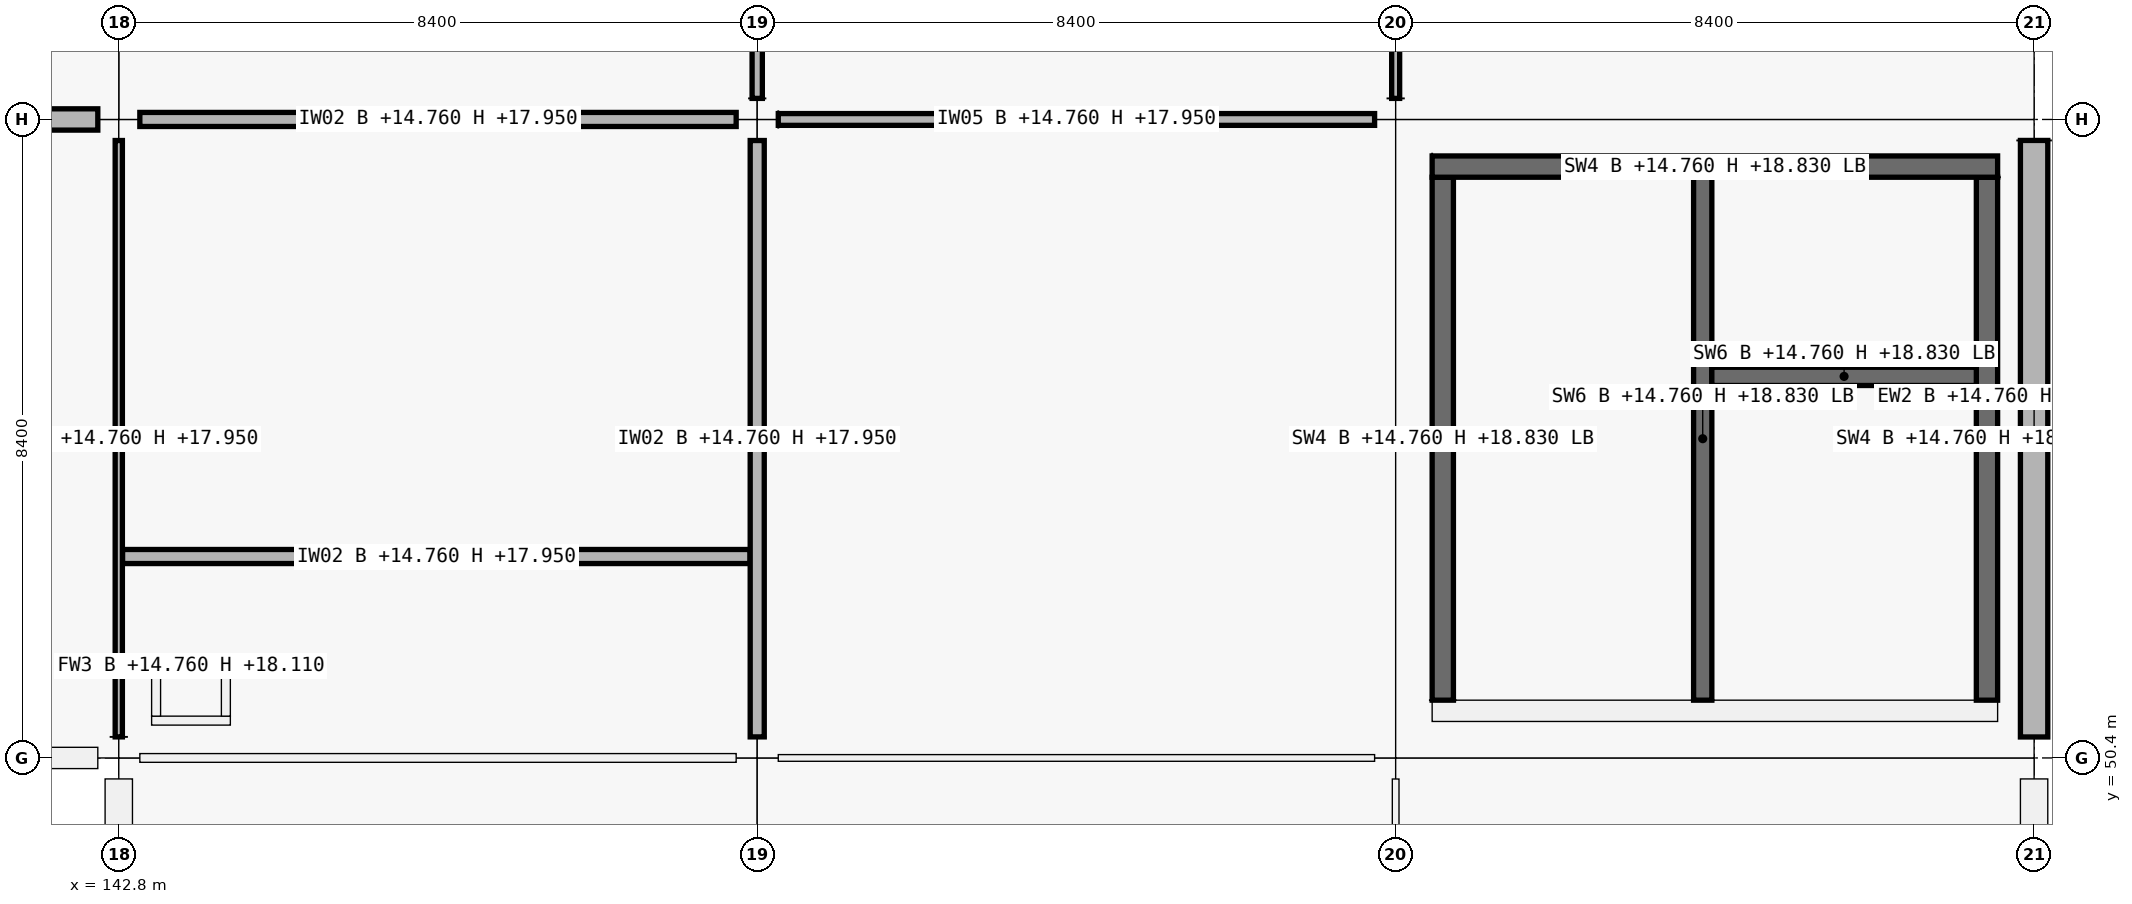
"""IFC4 building model, lengths in metres.
Left out: names, types, materials, properties, quantities, classifications, styles, units other than length and angle.
Written with IfcOpenShell. Run it as: python <this file> out.ifc"""

import sys

from ifc_helpers import new_model, si_unit, direction, frame, frame_2d, origin, origin_2d, place, context, subcontext, project, spatial, rectangle, i_section, extrude, element, fill, save


model = new_model("IFC4")
c1 = context("Model", 3, precision=1e-05, world=origin(), true_north=direction((0.0, 1.0)))
c2 = subcontext(c1, "Body", "Model", "MODEL_VIEW")
j1 = project(units=[si_unit("LENGTHUNIT", "METRE"), si_unit("PLANEANGLEUNIT", "RADIAN")], contexts=[c1])
p1 = place(None, origin())
s1 = spatial("IfcSite", under=j1, at=p1, CompositionType="ELEMENT")
p2 = place(p1, origin())
s2 = spatial("IfcBuilding", under=s1, at=p2, CompositionType="ELEMENT")
p3 = place(p2, frame((0.0, 0.0, 14.76)))
s3 = spatial("IfcBuildingStorey", under=s2, at=p3, CompositionType="ELEMENT", Elevation=14.76)
for number, where, z_axis, x_axis in (
    (1, (142.8, 50.4, 0.0), (0.0, 0.0, 1.0), (1.0, 0.0, 0.0)),
    (2, (142.8, 58.8, 0.0), (0.0, 0.0, 1.0), (1.0, 0.0, 0.0)),
    (3, (151.2, 50.4, 0.0), (0.0, 0.0, 1.0), (1.0, 0.0, 0.0)),
    (4, (151.2, 58.8, 0.0), (0.0, 0.0, 1.0), (1.0, 0.0, 0.0)),
    (5, (159.6, 50.4, 0.0), (0.0, 0.0, 1.0), (1.0, 0.0, 0.0)),
    (6, (159.6, 58.8, 0.0), (0.0, 0.0, 1.0), (1.0, 0.0, 0.0)),
    (7, (168.0, 50.4, 0.0), (0.0, 0.0, 1.0), (1.0, 0.0, 0.0)),
    (8, (168.0, 58.8, 0.0), (0.0, 0.0, 1.0), (1.0, 0.0, 0.0)),
):
    element("IfcColumn", number, at=place(p3, frame(where, z_axis=z_axis, x_axis=x_axis)), inside=s3, PredefinedType="COLUMN", context=c2, shape_type="SweptSolid", body=[
        extrude(rectangle(XDim=0.55, YDim=0.55, at=origin_2d()), origin(), (0.0, 0.0, 1.0), 4.17),
    ])
for number, where, z_axis, x_axis in (
    (9, (142.94, 50.4, 4.17), (0.0, 0.0, 1.0), (1.0, 0.0, 0.0)),
    (10, (151.2, 50.4, 4.17), (0.0, 0.0, 1.0), (1.0, 0.0, 0.0)),
    (11, (159.6, 50.4, 4.17), (0.0, 0.0, 1.0), (1.0, 0.0, 0.0)),
    (12, (167.86, 50.4, 4.17), (0.0, 0.0, 1.0), (1.0, 0.0, 0.0)),
    (13, (142.94, 58.8, 4.17), (0.0, 0.0, 1.0), (1.0, 0.0, 0.0)),
    (14, (151.2, 58.8, 4.17), (0.0, 0.0, 1.0), (1.0, 0.0, 0.0)),
    (15, (159.6, 58.8, 4.17), (0.0, 0.0, 1.0), (1.0, 0.0, 0.0)),
    (16, (167.86, 58.8, 4.17), (0.0, 0.0, 1.0), (1.0, 0.0, 0.0)),
):
    element("IfcColumn", number, at=place(p3, frame(where, z_axis=z_axis, x_axis=x_axis)), inside=s3, PredefinedType="COLUMN", context=c2, shape_type="SweptSolid", body=[
        extrude(i_section(OverallWidth=0.254, OverallDepth=0.254, WebThickness=0.009, FlangeThickness=0.014, FilletRadius=0.013, at=origin_2d()), origin(), (0.0, 0.0, 1.0), 2.157),
    ])
p4 = place(p3, frame((142.524, 50.4, 0.0), z_axis=(0.0, 0.0, 1.0), x_axis=(-1.0, 0.0, 0.0)))
e17 = element("IfcWall", 17, at=p4, inside=s3, PredefinedType="SOLIDWALL", context=c2, shape_type="SweptSolid", body=[
    extrude(rectangle(XDim=7.848, YDim=0.28, at=frame_2d((3.924, 0.0))), origin(), (0.0, 0.0, 1.0), 3.37),
])
p5 = place(p4, frame((3.124, 0.0, 0.9)))
e18 = element("IfcOpeningElement", 18, at=p5, cuts=e17, PredefinedType="OPENING", context=c2, shape_type="SweptSolid", body=[
    extrude(rectangle(XDim=1.6, YDim=2.1, at=frame_2d((0.8, 1.05))), frame((0.0, 0.14, 0.0), z_axis=(0.0, -1.0, 0.0), x_axis=(1.0, 0.0, 0.0)), (0.0, 0.0, 1.0), 0.28),
])
p6 = place(p3, frame((134.676, 58.8, 0.0), z_axis=(0.0, 0.0, 1.0), x_axis=(1.0, 0.0, 0.0)))
e19 = element("IfcWall", 19, at=p6, inside=s3, PredefinedType="SOLIDWALL", context=c2, shape_type="SweptSolid", body=[
    extrude(rectangle(XDim=7.848, YDim=0.28, at=frame_2d((3.924, 0.0))), origin(), (0.0, 0.0, 1.0), 3.37),
])
p7 = place(p6, frame((2.924, 0.0, 0.9)))
e20 = element("IfcOpeningElement", 20, at=p7, cuts=e19, PredefinedType="OPENING", context=c2, shape_type="SweptSolid", body=[
    extrude(rectangle(XDim=2.0, YDim=2.1, at=frame_2d((1.0, 1.05))), frame((0.0, 0.14, 0.0), z_axis=(0.0, -1.0, 0.0), x_axis=(1.0, 0.0, 0.0)), (0.0, 0.0, 1.0), 0.28),
])
p8 = place(p3, frame((142.8, 42.276, 0.0), z_axis=(0.0, 0.0, 1.0), x_axis=(0.0, 1.0, 0.0)))
e21 = element("IfcWall", 21, at=p8, inside=s3, PredefinedType="SOLIDWALL", context=c2, shape_type="SweptSolid", body=[
    extrude(rectangle(XDim=7.848, YDim=0.36, at=frame_2d((3.924, 0.0))), origin(), (0.0, 0.0, 1.0), 3.37),
])
p9 = place(p8, frame((2.824, 0.0, 0.9)))
e22 = element("IfcOpeningElement", 22, at=p9, cuts=e21, PredefinedType="OPENING", context=c2, shape_type="SweptSolid", body=[
    extrude(rectangle(XDim=2.2, YDim=1.35, at=frame_2d((1.1, 0.675))), frame((0.0, 0.18, 0.0), z_axis=(0.0, -1.0, 0.0), x_axis=(1.0, 0.0, 0.0)), (0.0, 0.0, 1.0), 0.36),
])
p10 = place(p3, frame((168.0, 50.124, 0.0), z_axis=(0.0, 0.0, 1.0), x_axis=(0.0, -1.0, 0.0)))
e23 = element("IfcWall", 23, at=p10, inside=s3, PredefinedType="SOLIDWALL", context=c2, shape_type="SweptSolid", body=[
    extrude(rectangle(XDim=7.848, YDim=0.36, at=frame_2d((3.924, 0.0))), origin(), (0.0, 0.0, 1.0), 3.37),
])
p11 = place(p10, frame((2.974, 0.0, 0.9)))
e24 = element("IfcOpeningElement", 24, at=p11, cuts=e23, PredefinedType="OPENING", context=c2, shape_type="SweptSolid", body=[
    extrude(rectangle(XDim=1.9, YDim=1.75, at=frame_2d((0.95, 0.875))), frame((0.0, 0.18, 0.0), z_axis=(0.0, -1.0, 0.0), x_axis=(1.0, 0.0, 0.0)), (0.0, 0.0, 1.0), 0.36),
])
p12 = place(p3, frame((168.0, 58.524, 0.0), z_axis=(0.0, 0.0, 1.0), x_axis=(0.0, -1.0, 0.0)))
e25 = element("IfcWall", 25, at=p12, inside=s3, PredefinedType="SOLIDWALL", context=c2, shape_type="SweptSolid", body=[
    extrude(rectangle(XDim=7.848, YDim=0.36, at=frame_2d((3.924, 0.0))), origin(), (0.0, 0.0, 1.0), 3.37),
])
p13 = place(p3, frame((167.52, 51.02, 0.0), z_axis=(0.0, 0.0, 1.0), x_axis=(-1.0, 0.0, 0.0)))
e26 = element("IfcWall", 26, at=p13, inside=s3, PredefinedType="SHEAR", context=c2, shape_type="SweptSolid", body=[
    extrude(rectangle(XDim=7.44, YDim=0.28, at=frame_2d((3.72, 0.0))), origin(), (0.0, 0.0, 1.0), 4.07),
])
p14 = place(p13, frame((1.28, 0.0, 0.0)))
e27 = element("IfcOpeningElement", 27, at=p14, cuts=e26, PredefinedType="OPENING", context=c2, shape_type="SweptSolid", body=[
    extrude(rectangle(XDim=1.5, YDim=2.15, at=frame_2d((0.75, 1.075))), frame((0.0, 0.14, 0.0), z_axis=(0.0, -1.0, 0.0), x_axis=(1.0, 0.0, 0.0)), (0.0, 0.0, 1.0), 0.28),
])
p15 = place(p3, frame((160.22, 51.16, 0.0), z_axis=(0.0, 0.0, 1.0), x_axis=(0.0, 1.0, 0.0)))
e28 = element("IfcWall", 28, at=p15, inside=s3, PredefinedType="SHEAR", context=c2, shape_type="SweptSolid", body=[
    extrude(rectangle(XDim=6.88, YDim=0.28, at=frame_2d((3.44, 0.0))), origin(), (0.0, 0.0, 1.0), 4.07),
])
p16 = place(p3, frame((160.08, 58.18, 0.0), z_axis=(0.0, 0.0, 1.0), x_axis=(1.0, 0.0, 0.0)))
e29 = element("IfcWall", 29, at=p16, inside=s3, PredefinedType="SHEAR", context=c2, shape_type="SweptSolid", body=[
    extrude(rectangle(XDim=7.44, YDim=0.28, at=frame_2d((3.72, 0.0))), origin(), (0.0, 0.0, 1.0), 4.07),
])
p17 = place(p3, frame((167.38, 58.04, 0.0), z_axis=(0.0, 0.0, 1.0), x_axis=(0.0, -1.0, 0.0)))
e30 = element("IfcWall", 30, at=p17, inside=s3, PredefinedType="SHEAR", context=c2, shape_type="SweptSolid", body=[
    extrude(rectangle(XDim=6.88, YDim=0.28, at=frame_2d((3.44, 0.0))), origin(), (0.0, 0.0, 1.0), 4.07),
])
p18 = place(p3, frame((163.64, 51.16, 0.0), z_axis=(0.0, 0.0, 1.0), x_axis=(0.0, 1.0, 0.0)))
e31 = element("IfcWall", 31, at=p18, inside=s3, PredefinedType="SHEAR", context=c2, shape_type="SweptSolid", body=[
    extrude(rectangle(XDim=6.88, YDim=0.24, at=frame_2d((3.44, 0.0))), origin(), (0.0, 0.0, 1.0), 4.07),
])
p19 = place(p18, frame((0.12, 0.0, 0.0)))
e32 = element("IfcOpeningElement", 32, at=p19, cuts=e31, PredefinedType="OPENING", context=c2, shape_type="SweptSolid", body=[
    extrude(rectangle(XDim=1.0, YDim=2.15, at=frame_2d((0.5, 1.075))), frame((0.0, 0.12, 0.0), z_axis=(0.0, -1.0, 0.0), x_axis=(1.0, 0.0, 0.0)), (0.0, 0.0, 1.0), 0.24),
])
p20 = place(p3, frame((163.76, 55.42, 0.0), z_axis=(0.0, 0.0, 1.0), x_axis=(1.0, 0.0, 0.0)))
e33 = element("IfcWall", 33, at=p20, inside=s3, PredefinedType="SHEAR", context=c2, shape_type="SweptSolid", body=[
    extrude(rectangle(XDim=3.48, YDim=0.24, at=frame_2d((1.74, 0.0))), origin(), (0.0, 0.0, 1.0), 4.07),
])
p21 = place(p20, frame((1.09, 0.0, 0.0)))
e34 = element("IfcOpeningElement", 34, at=p21, cuts=e33, PredefinedType="OPENING", context=c2, shape_type="SweptSolid", body=[
    extrude(rectangle(XDim=1.3, YDim=2.25, at=frame_2d((0.65, 1.125))), frame((0.0, 0.12, 0.0), z_axis=(0.0, -1.0, 0.0), x_axis=(1.0, 0.0, 0.0)), (0.0, 0.0, 1.0), 0.24),
])
for number, where, z_axis, x_axis in (
    (35, (143.232, 50.891, 0.0), (0.0, 0.0, 1.0), (1.0, 0.0, 0.0)),
    (36, (143.232, 51.609, 0.0), (0.0, 0.0, 1.0), (1.0, 0.0, 0.0)),
):
    element("IfcWall", number, at=place(p3, frame(where, z_axis=z_axis, x_axis=x_axis)), inside=s3, PredefinedType="PARTITIONING", context=c2, shape_type="SweptSolid", body=[
        extrude(rectangle(XDim=1.036, YDim=0.118, at=frame_2d((0.518, 0.0))), origin(), (0.0, 0.0, 1.0), 3.35),
    ])
for number, where, z_axis, x_axis in (
    (37, (143.291, 50.95, 0.0), (0.0, 0.0, 1.0), (0.0, 1.0, 0.0)),
    (38, (144.209, 50.95, 0.0), (0.0, 0.0, 1.0), (0.0, 1.0, 0.0)),
):
    element("IfcWall", number, at=place(p3, frame(where, z_axis=z_axis, x_axis=x_axis)), inside=s3, PredefinedType="PARTITIONING", context=c2, shape_type="SweptSolid", body=[
        extrude(rectangle(XDim=0.6, YDim=0.118, at=frame_2d((0.3, 0.0))), origin(), (0.0, 0.0, 1.0), 3.35),
    ])
p22 = place(p3, frame((143.077, 50.4, 0.0), z_axis=(0.0, 0.0, 1.0), x_axis=(1.0, 0.0, 0.0)))
e39 = element("IfcWall", 39, at=p22, inside=s3, PredefinedType="PARTITIONING", context=c2, shape_type="SweptSolid", body=[
    extrude(rectangle(XDim=7.846, YDim=0.115, at=frame_2d((3.923, 0.0))), origin(), (0.0, 0.0, 1.0), 3.19),
])
p23 = place(p3, frame((143.077, 58.8, 0.0), z_axis=(0.0, 0.0, 1.0), x_axis=(1.0, 0.0, 0.0)))
e40 = element("IfcWall", 40, at=p23, inside=s3, PredefinedType="PARTITIONING", context=c2, shape_type="SweptSolid", body=[
    extrude(rectangle(XDim=7.846, YDim=0.185, at=frame_2d((3.923, 0.0))), origin(), (0.0, 0.0, 1.0), 3.19),
])
p24 = place(p3, frame((151.477, 50.4, 0.0), z_axis=(0.0, 0.0, 1.0), x_axis=(1.0, 0.0, 0.0)))
e41 = element("IfcWall", 41, at=p24, inside=s3, PredefinedType="PARTITIONING", context=c2, shape_type="SweptSolid", body=[
    extrude(rectangle(XDim=7.846, YDim=0.088, at=frame_2d((3.923, 0.0))), origin(), (0.0, 0.0, 1.0), 3.19),
])
p25 = place(p24, frame((3.458, 0.0, 0.0)))
e42 = element("IfcOpeningElement", 42, at=p25, cuts=e41, PredefinedType="OPENING", context=c2, shape_type="SweptSolid", body=[
    extrude(rectangle(XDim=0.93, YDim=2.12, at=frame_2d((0.465, 1.06))), frame((0.0, 0.044, 0.0), z_axis=(0.0, -1.0, 0.0), x_axis=(1.0, 0.0, 0.0)), (0.0, 0.0, 1.0), 0.088),
])
p26 = place(p3, frame((151.477, 58.8, 0.0), z_axis=(0.0, 0.0, 1.0), x_axis=(1.0, 0.0, 0.0)))
e43 = element("IfcWall", 43, at=p26, inside=s3, PredefinedType="PARTITIONING", context=c2, shape_type="SweptSolid", body=[
    extrude(rectangle(XDim=7.846, YDim=0.155, at=frame_2d((3.923, 0.0))), origin(), (0.0, 0.0, 1.0), 3.19),
])
p27 = place(p26, frame((3.383, 0.0, 0.0)))
e44 = element("IfcOpeningElement", 44, at=p27, cuts=e43, PredefinedType="OPENING", context=c2, shape_type="SweptSolid", body=[
    extrude(rectangle(XDim=1.08, YDim=2.25, at=frame_2d((0.54, 1.125))), frame((0.0, 0.078, 0.0), z_axis=(0.0, -1.0, 0.0), x_axis=(1.0, 0.0, 0.0)), (0.0, 0.0, 1.0), 0.155),
])
p28 = place(p3, frame((142.8, 50.677, 0.0), z_axis=(0.0, 0.0, 1.0), x_axis=(0.0, 1.0, 0.0)))
e45 = element("IfcWall", 45, at=p28, inside=s3, PredefinedType="PARTITIONING", context=c2, shape_type="SweptSolid", body=[
    extrude(rectangle(XDim=7.846, YDim=0.095, at=frame_2d((3.923, 0.0))), origin(), (0.0, 0.0, 1.0), 3.19),
])
p29 = place(p28, frame((0.708, 0.0, 0.0)))
e46 = element("IfcOpeningElement", 46, at=p29, cuts=e45, PredefinedType="OPENING", context=c2, shape_type="SweptSolid", body=[
    extrude(rectangle(XDim=0.96, YDim=2.1, at=frame_2d((0.48, 1.05))), frame((0.0, 0.047, 0.0), z_axis=(0.0, -1.0, 0.0), x_axis=(1.0, 0.0, 0.0)), (0.0, 0.0, 1.0), 0.095),
])
p30 = place(p28, frame((4.648, 0.0, 0.0)))
e47 = element("IfcOpeningElement", 47, at=p30, cuts=e45, PredefinedType="OPENING", context=c2, shape_type="SweptSolid", body=[
    extrude(rectangle(XDim=0.92, YDim=2.1, at=frame_2d((0.46, 1.05))), frame((0.0, 0.047, 0.0), z_axis=(0.0, -1.0, 0.0), x_axis=(1.0, 0.0, 0.0)), (0.0, 0.0, 1.0), 0.095),
])
p31 = place(p3, frame((151.2, 50.677, 0.0), z_axis=(0.0, 0.0, 1.0), x_axis=(0.0, 1.0, 0.0)))
e48 = element("IfcWall", 48, at=p31, inside=s3, PredefinedType="PARTITIONING", context=c2, shape_type="SweptSolid", body=[
    extrude(rectangle(XDim=7.846, YDim=0.185, at=frame_2d((3.923, 0.0))), origin(), (0.0, 0.0, 1.0), 3.19),
])
p32 = place(p3, frame((151.2, 59.077, 0.0), z_axis=(0.0, 0.0, 1.0), x_axis=(0.0, 1.0, 0.0)))
e49 = element("IfcWall", 49, at=p32, inside=s3, PredefinedType="PARTITIONING", context=c2, shape_type="SweptSolid", body=[
    extrude(rectangle(XDim=7.846, YDim=0.135, at=frame_2d((3.923, 0.0))), origin(), (0.0, 0.0, 1.0), 3.19),
])
p33 = place(p32, frame((3.443, 0.0, 0.0)))
e50 = element("IfcOpeningElement", 50, at=p33, cuts=e49, PredefinedType="OPENING", context=c2, shape_type="SweptSolid", body=[
    extrude(rectangle(XDim=0.96, YDim=2.18, at=frame_2d((0.48, 1.09))), frame((0.0, 0.067, 0.0), z_axis=(0.0, -1.0, 0.0), x_axis=(1.0, 0.0, 0.0)), (0.0, 0.0, 1.0), 0.135),
])
p34 = place(p3, frame((159.6, 42.277, 0.0), z_axis=(0.0, 0.0, 1.0), x_axis=(0.0, 1.0, 0.0)))
e51 = element("IfcWall", 51, at=p34, inside=s3, PredefinedType="PARTITIONING", context=c2, shape_type="SweptSolid", body=[
    extrude(rectangle(XDim=7.846, YDim=0.088, at=frame_2d((3.923, 0.0))), origin(), (0.0, 0.0, 1.0), 3.19),
])
p35 = place(p34, frame((3.463, 0.0, 0.0)))
e52 = element("IfcOpeningElement", 52, at=p35, cuts=e51, PredefinedType="OPENING", context=c2, shape_type="SweptSolid", body=[
    extrude(rectangle(XDim=0.92, YDim=2.15, at=frame_2d((0.46, 1.075))), frame((0.0, 0.044, 0.0), z_axis=(0.0, -1.0, 0.0), x_axis=(1.0, 0.0, 0.0)), (0.0, 0.0, 1.0), 0.088),
])
p36 = place(p3, frame((159.6, 59.077, 0.0), z_axis=(0.0, 0.0, 1.0), x_axis=(0.0, 1.0, 0.0)))
e53 = element("IfcWall", 53, at=p36, inside=s3, PredefinedType="PARTITIONING", context=c2, shape_type="SweptSolid", body=[
    extrude(rectangle(XDim=7.846, YDim=0.105, at=frame_2d((3.923, 0.0))), origin(), (0.0, 0.0, 1.0), 3.19),
])
p37 = place(p36, frame((3.463, 0.0, 0.0)))
e54 = element("IfcOpeningElement", 54, at=p37, cuts=e53, PredefinedType="OPENING", context=c2, shape_type="SweptSolid", body=[
    extrude(rectangle(XDim=0.92, YDim=2.15, at=frame_2d((0.46, 1.075))), frame((0.0, 0.052, 0.0), z_axis=(0.0, -1.0, 0.0), x_axis=(1.0, 0.0, 0.0)), (0.0, 0.0, 1.0), 0.105),
])
p38 = place(p3, frame((142.85, 53.05, 0.0), z_axis=(0.0, 0.0, 1.0), x_axis=(1.0, 0.0, 0.0)))
e55 = element("IfcWall", 55, at=p38, inside=s3, PredefinedType="PARTITIONING", context=c2, shape_type="SweptSolid", body=[
    extrude(rectangle(XDim=8.256, YDim=0.185, at=frame_2d((4.128, 0.0))), origin(), (0.0, 0.0, 1.0), 3.19),
])
p39 = place(p19, origin())
e56 = element("IfcDoor", 56, at=p39, inside=s3, OperationType="SINGLE_SWING_LEFT", PredefinedType="DOOR", context=c2, shape_type="SweptSolid", body=[
    extrude(rectangle(XDim=1.0, YDim=2.15, at=frame_2d((0.5, 1.075))), frame((0.0, 0.025, 0.0), z_axis=(0.0, -1.0, 0.0), x_axis=(1.0, 0.0, 0.0)), (0.0, 0.0, 1.0), 0.05),
])
fill(e32, e56)
p40 = place(p14, origin())
e57 = element("IfcDoor", 57, at=p40, inside=s3, OperationType="DOUBLE_DOOR_SINGLE_SWING", PredefinedType="DOOR", context=c2, shape_type="SweptSolid", body=[
    extrude(rectangle(XDim=1.5, YDim=2.15, at=frame_2d((0.75, 1.075))), frame((0.0, 0.025, 0.0), z_axis=(0.0, -1.0, 0.0), x_axis=(1.0, 0.0, 0.0)), (0.0, 0.0, 1.0), 0.05),
])
fill(e27, e57)
p41 = place(p21, origin())
e58 = element("IfcDoor", 58, at=p41, inside=s3, OperationType="DOUBLE_DOOR_SLIDING", PredefinedType="DOOR", context=c2, shape_type="SweptSolid", body=[
    extrude(rectangle(XDim=1.3, YDim=2.25, at=frame_2d((0.65, 1.125))), frame((0.0, 0.025, 0.0), z_axis=(0.0, -1.0, 0.0), x_axis=(1.0, 0.0, 0.0)), (0.0, 0.0, 1.0), 0.05),
])
fill(e34, e58)
p42 = place(p29, origin())
e59 = element("IfcDoor", 59, at=p42, inside=s3, OperationType="SINGLE_SWING_RIGHT", PredefinedType="DOOR", context=c2, shape_type="SweptSolid", body=[
    extrude(rectangle(XDim=0.96, YDim=2.1, at=frame_2d((0.48, 1.05))), frame((0.0, 0.025, 0.0), z_axis=(0.0, -1.0, 0.0), x_axis=(1.0, 0.0, 0.0)), (0.0, 0.0, 1.0), 0.05),
])
fill(e46, e59)
p43 = place(p30, origin())
e60 = element("IfcDoor", 60, at=p43, inside=s3, OperationType="SINGLE_SWING_LEFT", PredefinedType="DOOR", context=c2, shape_type="SweptSolid", body=[
    extrude(rectangle(XDim=0.92, YDim=2.1, at=frame_2d((0.46, 1.05))), frame((0.0, 0.025, 0.0), z_axis=(0.0, -1.0, 0.0), x_axis=(1.0, 0.0, 0.0)), (0.0, 0.0, 1.0), 0.05),
])
fill(e47, e60)
p44 = place(p25, origin())
e61 = element("IfcDoor", 61, at=p44, inside=s3, OperationType="SINGLE_SWING_LEFT", PredefinedType="DOOR", context=c2, shape_type="SweptSolid", body=[
    extrude(rectangle(XDim=0.93, YDim=2.12, at=frame_2d((0.465, 1.06))), frame((0.0, 0.025, 0.0), z_axis=(0.0, -1.0, 0.0), x_axis=(1.0, 0.0, 0.0)), (0.0, 0.0, 1.0), 0.05),
])
fill(e42, e61)
p45 = place(p27, origin())
e62 = element("IfcDoor", 62, at=p45, inside=s3, OperationType="SINGLE_SWING_RIGHT", PredefinedType="DOOR", context=c2, shape_type="SweptSolid", body=[
    extrude(rectangle(XDim=1.08, YDim=2.25, at=frame_2d((0.54, 1.125))), frame((0.0, 0.025, 0.0), z_axis=(0.0, -1.0, 0.0), x_axis=(1.0, 0.0, 0.0)), (0.0, 0.0, 1.0), 0.05),
])
fill(e44, e62)
save(model, sys.argv[1])
